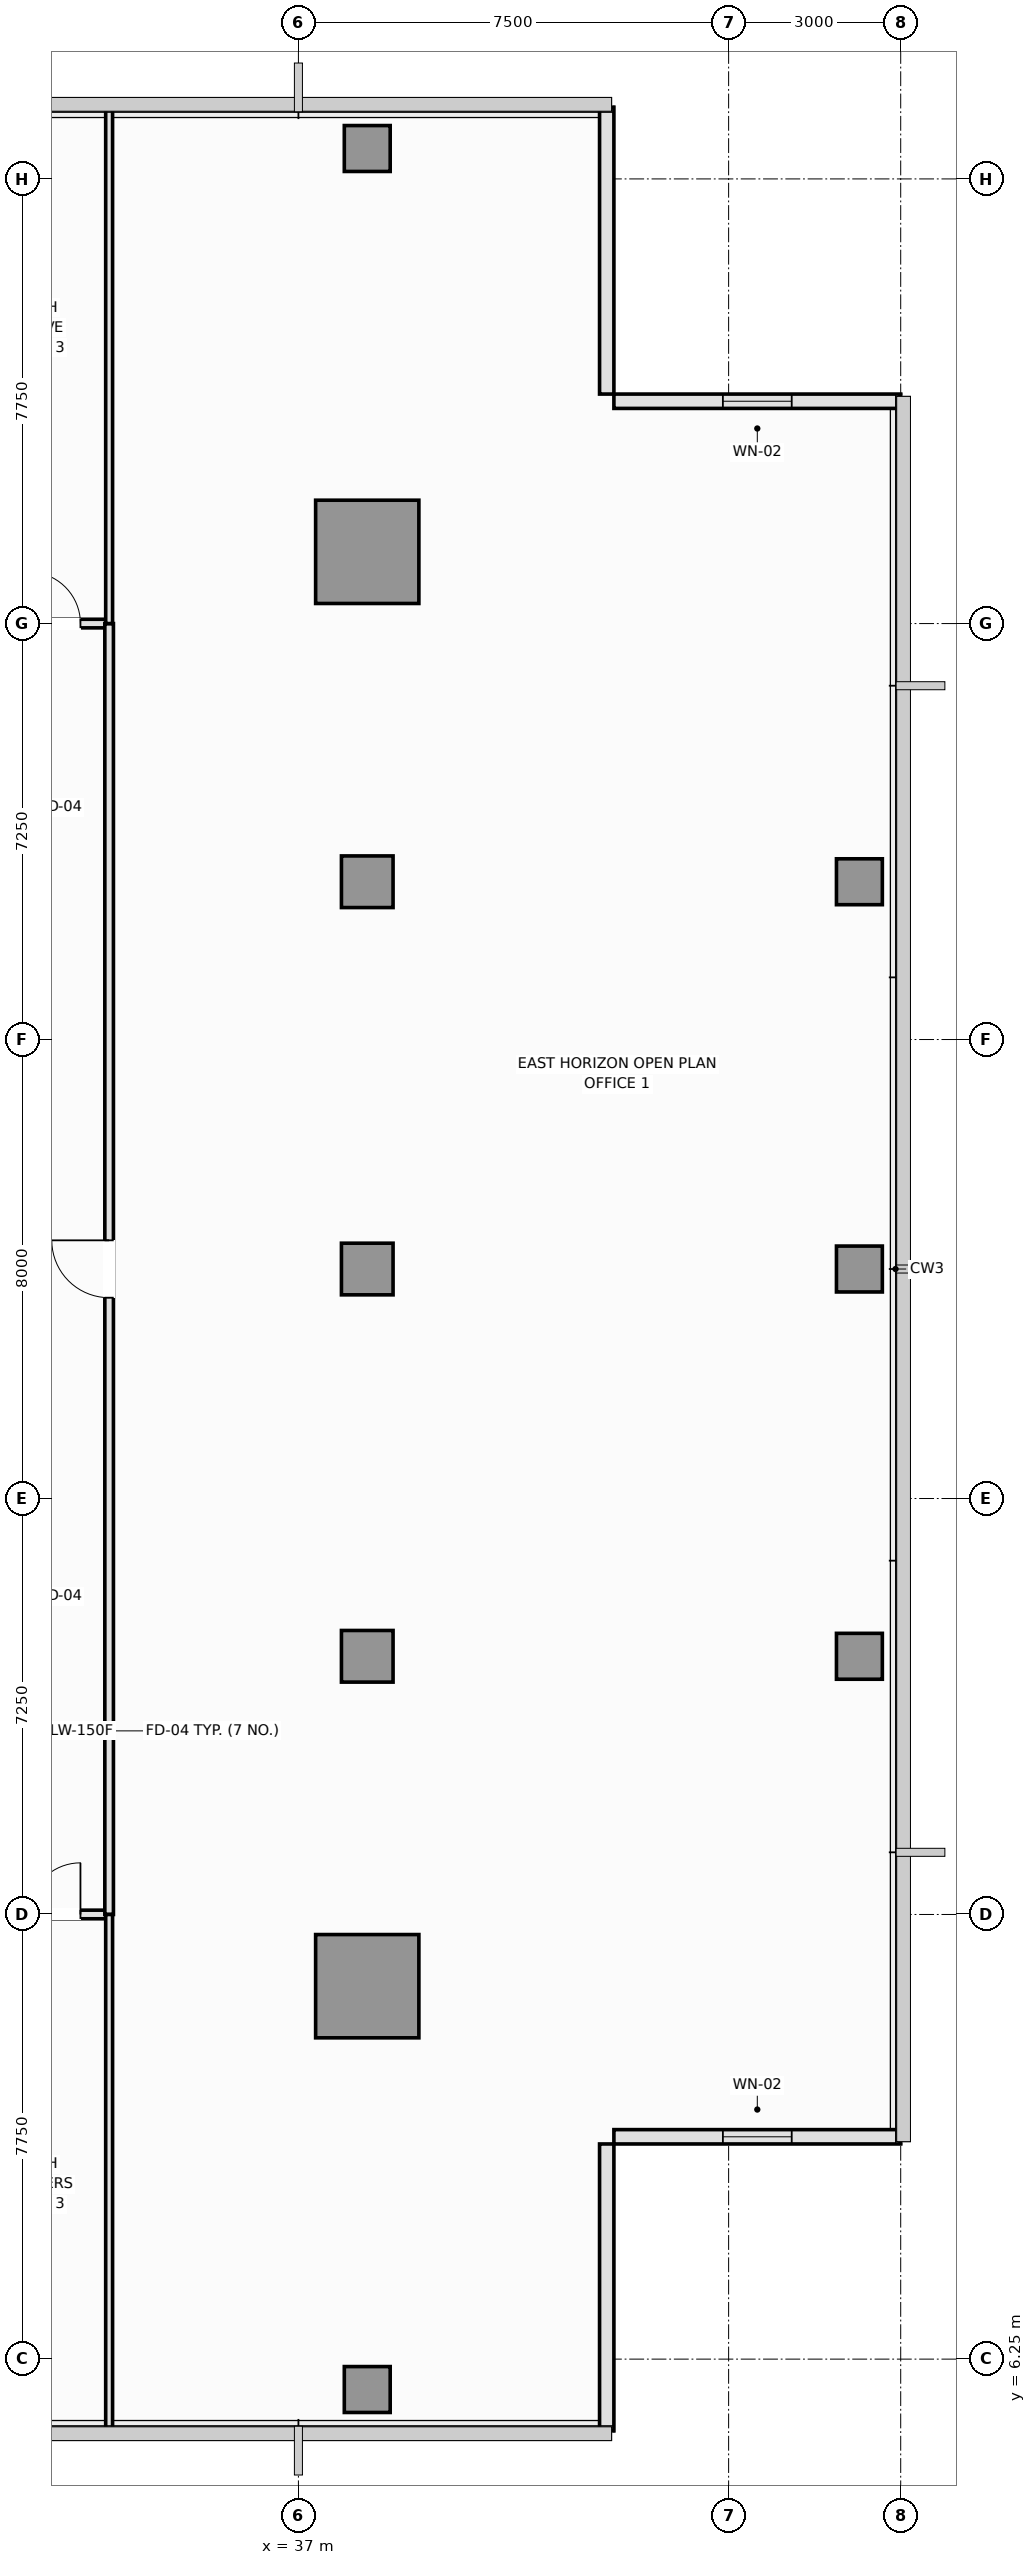
"""IFC4 building model, lengths in metres.
Left out: names, types, materials, properties, quantities, classifications, styles, units other than length and angle.
Written with IfcOpenShell. Run it as: python <this file> out.ifc"""

import sys

from ifc_helpers import new_model, si_unit, direction, frame, frame_2d, origin, origin_2d, place, context, subcontext, project, spatial, rectangle, extrude, element, fill, save


model = new_model("IFC4")
c1 = context("Model", 3, precision=1e-05, world=origin(), true_north=direction((0.0, 1.0)))
c2 = subcontext(c1, "Body", "Model", "MODEL_VIEW")
j1 = project(units=[si_unit("LENGTHUNIT", "METRE"), si_unit("PLANEANGLEUNIT", "RADIAN")], contexts=[c1])
p1 = place(None, origin())
s1 = spatial("IfcSite", under=j1, at=p1, CompositionType="ELEMENT")
p2 = place(p1, origin())
s2 = spatial("IfcBuilding", under=s1, at=p2, CompositionType="ELEMENT")
p3 = place(p2, frame((0.0, 0.0, 212.9)))
s3 = spatial("IfcBuildingStorey", under=s2, at=p3, CompositionType="ELEMENT", Elevation=212.9)
for number, where, z_axis, x_axis in (
    (1, (38.2, 12.75, 0.0), (0.0, 0.0, 1.0), (1.0, 0.0, 0.0)),
    (2, (38.2, 37.75, 0.0), (0.0, 0.0, 1.0), (1.0, 0.0, 0.0)),
):
    element("IfcColumn", number, at=place(p3, frame(where, z_axis=z_axis, x_axis=x_axis)), inside=s3, PredefinedType="COLUMN", context=c2, shape_type="SweptSolid", body=[
        extrude(rectangle(XDim=1.8, YDim=1.8, at=origin_2d()), origin(), (0.0, 0.0, 1.0), 3.55),
    ])
for number, where, z_axis, x_axis in (
    (3, (38.2, 18.5, 0.0), (0.0, 0.0, 1.0), (1.0, 0.0, 0.0)),
    (4, (38.2, 25.25, 0.0), (0.0, 0.0, 1.0), (1.0, 0.0, 0.0)),
    (5, (38.2, 32.0, 0.0), (0.0, 0.0, 1.0), (1.0, 0.0, 0.0)),
):
    element("IfcColumn", number, at=place(p3, frame(where, z_axis=z_axis, x_axis=x_axis)), inside=s3, PredefinedType="COLUMN", context=c2, shape_type="SweptSolid", body=[
        extrude(rectangle(XDim=0.9, YDim=0.9, at=origin_2d()), origin(), (0.0, 0.0, 1.0), 3.55),
    ])
for number, where, z_axis, x_axis in (
    (6, (46.78, 18.5, 0.0), (0.0, 0.0, 1.0), (1.0, 0.0, 0.0)),
    (7, (46.78, 25.25, 0.0), (0.0, 0.0, 1.0), (1.0, 0.0, 0.0)),
    (8, (46.78, 32.0, 0.0), (0.0, 0.0, 1.0), (1.0, 0.0, 0.0)),
    (9, (38.2, 5.72, 0.0), (0.0, 0.0, 1.0), (1.0, 0.0, 0.0)),
    (10, (38.2, 44.78, 0.0), (0.0, 0.0, 1.0), (1.0, 0.0, 0.0)),
):
    element("IfcColumn", number, at=place(p3, frame(where, z_axis=z_axis, x_axis=x_axis)), inside=s3, PredefinedType="COLUMN", context=c2, shape_type="SweptSolid", body=[
        extrude(rectangle(XDim=0.8, YDim=0.8, at=origin_2d()), origin(), (0.0, 0.0, 1.0), 3.55),
    ])
p4 = place(p3, frame((42.375, 5.0, 0.0), z_axis=(0.0, 0.0, 1.0), x_axis=(0.0, 1.0, 0.0)))
e11 = element("IfcWall", 11, at=p4, inside=s3, PredefinedType="SOLIDWALL", context=c2, shape_type="SweptSolid", body=[
    extrude(rectangle(XDim=5.0, YDim=0.25, at=frame_2d((2.5, 0.0))), origin(), (0.0, 0.0, 1.0), 3.37),
])
p5 = place(p3, frame((42.5, 10.125, 0.0), z_axis=(0.0, 0.0, 1.0), x_axis=(1.0, 0.0, 0.0)))
e12 = element("IfcWall", 12, at=p5, inside=s3, PredefinedType="SOLIDWALL", context=c2, shape_type="SweptSolid", body=[
    extrude(rectangle(XDim=5.0, YDim=0.25, at=frame_2d((2.5, 0.0))), origin(), (0.0, 0.0, 1.0), 3.37),
])
p6 = place(p5, frame((1.9, 0.0, 0.9)))
e13 = element("IfcOpeningElement", 13, at=p6, cuts=e12, PredefinedType="OPENING", context=c2, shape_type="SweptSolid", body=[
    extrude(rectangle(XDim=1.2, YDim=1.8, at=frame_2d((0.6, 0.9))), frame((0.0, 0.135, 0.0), z_axis=(0.0, -1.0, 0.0), x_axis=(1.0, 0.0, 0.0)), (0.0, 0.0, 1.0), 0.27),
])
p7 = place(p3, frame((47.5, 40.375, 0.0), z_axis=(0.0, 0.0, 1.0), x_axis=(-1.0, 0.0, 0.0)))
e14 = element("IfcWall", 14, at=p7, inside=s3, PredefinedType="SOLIDWALL", context=c2, shape_type="SweptSolid", body=[
    extrude(rectangle(XDim=5.0, YDim=0.25, at=frame_2d((2.5, 0.0))), origin(), (0.0, 0.0, 1.0), 3.37),
])
p8 = place(p7, frame((1.9, 0.0, 0.9)))
e15 = element("IfcOpeningElement", 15, at=p8, cuts=e14, PredefinedType="OPENING", context=c2, shape_type="SweptSolid", body=[
    extrude(rectangle(XDim=1.2, YDim=1.8, at=frame_2d((0.6, 0.9))), frame((0.0, 0.135, 0.0), z_axis=(0.0, -1.0, 0.0), x_axis=(1.0, 0.0, 0.0)), (0.0, 0.0, 1.0), 0.27),
])
p9 = place(p3, frame((42.375, 40.5, 0.0), z_axis=(0.0, 0.0, 1.0), x_axis=(0.0, 1.0, 0.0)))
e16 = element("IfcWall", 16, at=p9, inside=s3, PredefinedType="SOLIDWALL", context=c2, shape_type="SweptSolid", body=[
    extrude(rectangle(XDim=5.0, YDim=0.25, at=frame_2d((2.5, 0.0))), origin(), (0.0, 0.0, 1.0), 3.37),
])
p10 = place(p3, frame((31.8, 14.0, 0.0), z_axis=(0.0, 0.0, 1.0), x_axis=(1.0, 0.0, 0.0)))
e17 = element("IfcWall", 17, at=p10, inside=s3, PredefinedType="PARTITIONING", context=c2, shape_type="SweptSolid", body=[
    extrude(rectangle(XDim=1.9, YDim=0.15, at=frame_2d((0.95, 0.0))), origin(), (0.0, 0.0, 1.0), 3.37),
])
p11 = place(p10, frame((0.5, 0.0, 0.0)))
e18 = element("IfcOpeningElement", 18, at=p11, cuts=e17, PredefinedType="OPENING", context=c2, shape_type="SweptSolid", body=[
    extrude(rectangle(XDim=0.9, YDim=2.1, at=frame_2d((0.45, 1.05))), frame((0.0, 0.085, 0.0), z_axis=(0.0, -1.0, 0.0), x_axis=(1.0, 0.0, 0.0)), (0.0, 0.0, 1.0), 0.17),
])
p12 = place(p3, frame((31.8, 36.5, 0.0), z_axis=(0.0, 0.0, 1.0), x_axis=(1.0, 0.0, 0.0)))
e19 = element("IfcWall", 19, at=p12, inside=s3, PredefinedType="PARTITIONING", context=c2, shape_type="SweptSolid", body=[
    extrude(rectangle(XDim=1.9, YDim=0.15, at=frame_2d((0.95, 0.0))), origin(), (0.0, 0.0, 1.0), 3.37),
])
p13 = place(p12, frame((0.5, 0.0, 0.0)))
e20 = element("IfcOpeningElement", 20, at=p13, cuts=e19, PredefinedType="OPENING", context=c2, shape_type="SweptSolid", body=[
    extrude(rectangle(XDim=0.9, YDim=2.1, at=frame_2d((0.45, 1.05))), frame((0.0, 0.085, 0.0), z_axis=(0.0, -1.0, 0.0), x_axis=(1.0, 0.0, 0.0)), (0.0, 0.0, 1.0), 0.17),
])
p14 = place(p3, frame((33.7, 14.0, 0.0), z_axis=(0.0, 0.0, 1.0), x_axis=(0.0, 1.0, 0.0)))
e21 = element("IfcWall", 21, at=p14, inside=s3, PredefinedType="PARTITIONING", context=c2, shape_type="SweptSolid", body=[
    extrude(rectangle(XDim=22.5, YDim=0.15, at=frame_2d((11.25, 0.0))), origin(), (0.0, 0.0, 1.0), 3.37),
])
p15 = place(p14, frame((10.75, 0.0, 0.0)))
e22 = element("IfcOpeningElement", 22, at=p15, cuts=e21, PredefinedType="OPENING", context=c2, shape_type="SweptSolid", body=[
    extrude(rectangle(XDim=1.0, YDim=2.15, at=frame_2d((0.5, 1.075))), frame((0.0, 0.085, 0.0), z_axis=(0.0, -1.0, 0.0), x_axis=(1.0, 0.0, 0.0)), (0.0, 0.0, 1.0), 0.17),
])
for number, where, z_axis, x_axis in (
    (23, (33.7, 5.01, 0.0), (0.0, 0.0, 1.0), (0.0, 1.0, 0.0)),
    (24, (33.7, 36.5, 0.0), (0.0, 0.0, 1.0), (0.0, 1.0, 0.0)),
):
    element("IfcWall", number, at=place(p3, frame(where, z_axis=z_axis, x_axis=x_axis)), inside=s3, PredefinedType="PARTITIONING", context=c2, shape_type="SweptSolid", body=[
        extrude(rectangle(XDim=8.99, YDim=0.12, at=frame_2d((4.495, 0.0))), origin(), (0.0, 0.0, 1.0), 3.37),
    ])
p16 = place(p6, origin())
e25 = element("IfcWindow", 25, at=p16, inside=s3, PartitioningType="SINGLE_PANEL", PredefinedType="WINDOW", context=c2, shape_type="SweptSolid", body=[
    extrude(rectangle(XDim=1.2, YDim=1.8, at=frame_2d((0.6, 0.9))), frame((0.0, 0.03, 0.0), z_axis=(0.0, -1.0, 0.0), x_axis=(1.0, 0.0, 0.0)), (0.0, 0.0, 1.0), 0.06),
])
fill(e13, e25)
p17 = place(p8, origin())
e26 = element("IfcWindow", 26, at=p17, inside=s3, PartitioningType="SINGLE_PANEL", PredefinedType="WINDOW", context=c2, shape_type="SweptSolid", body=[
    extrude(rectangle(XDim=1.2, YDim=1.8, at=frame_2d((0.6, 0.9))), frame((0.0, 0.03, 0.0), z_axis=(0.0, -1.0, 0.0), x_axis=(1.0, 0.0, 0.0)), (0.0, 0.0, 1.0), 0.06),
])
fill(e15, e26)
p18 = place(p11, origin())
e27 = element("IfcDoor", 27, at=p18, inside=s3, OperationType="SINGLE_SWING_RIGHT", PredefinedType="DOOR", context=c2, shape_type="SweptSolid", body=[
    extrude(rectangle(XDim=0.9, YDim=2.1, at=frame_2d((0.45, 1.05))), frame((0.0, 0.025, 0.0), z_axis=(0.0, -1.0, 0.0), x_axis=(1.0, 0.0, 0.0)), (0.0, 0.0, 1.0), 0.05),
])
fill(e18, e27)
p19 = place(p13, origin())
e28 = element("IfcDoor", 28, at=p19, inside=s3, OperationType="SINGLE_SWING_LEFT", PredefinedType="DOOR", context=c2, shape_type="SweptSolid", body=[
    extrude(rectangle(XDim=0.9, YDim=2.1, at=frame_2d((0.45, 1.05))), frame((0.0, 0.025, 0.0), z_axis=(0.0, -1.0, 0.0), x_axis=(1.0, 0.0, 0.0)), (0.0, 0.0, 1.0), 0.05),
])
fill(e20, e28)
p20 = place(p15, origin())
e29 = element("IfcDoor", 29, at=p20, inside=s3, OperationType="SINGLE_SWING_RIGHT", PredefinedType="DOOR", context=c2, shape_type="SweptSolid", body=[
    extrude(rectangle(XDim=1.0, YDim=2.15, at=frame_2d((0.5, 1.075))), frame((0.0, 0.025, 0.0), z_axis=(0.0, -1.0, 0.0), x_axis=(1.0, 0.0, 0.0)), (0.0, 0.0, 1.0), 0.05),
])
fill(e22, e29)
save(model, sys.argv[1])
